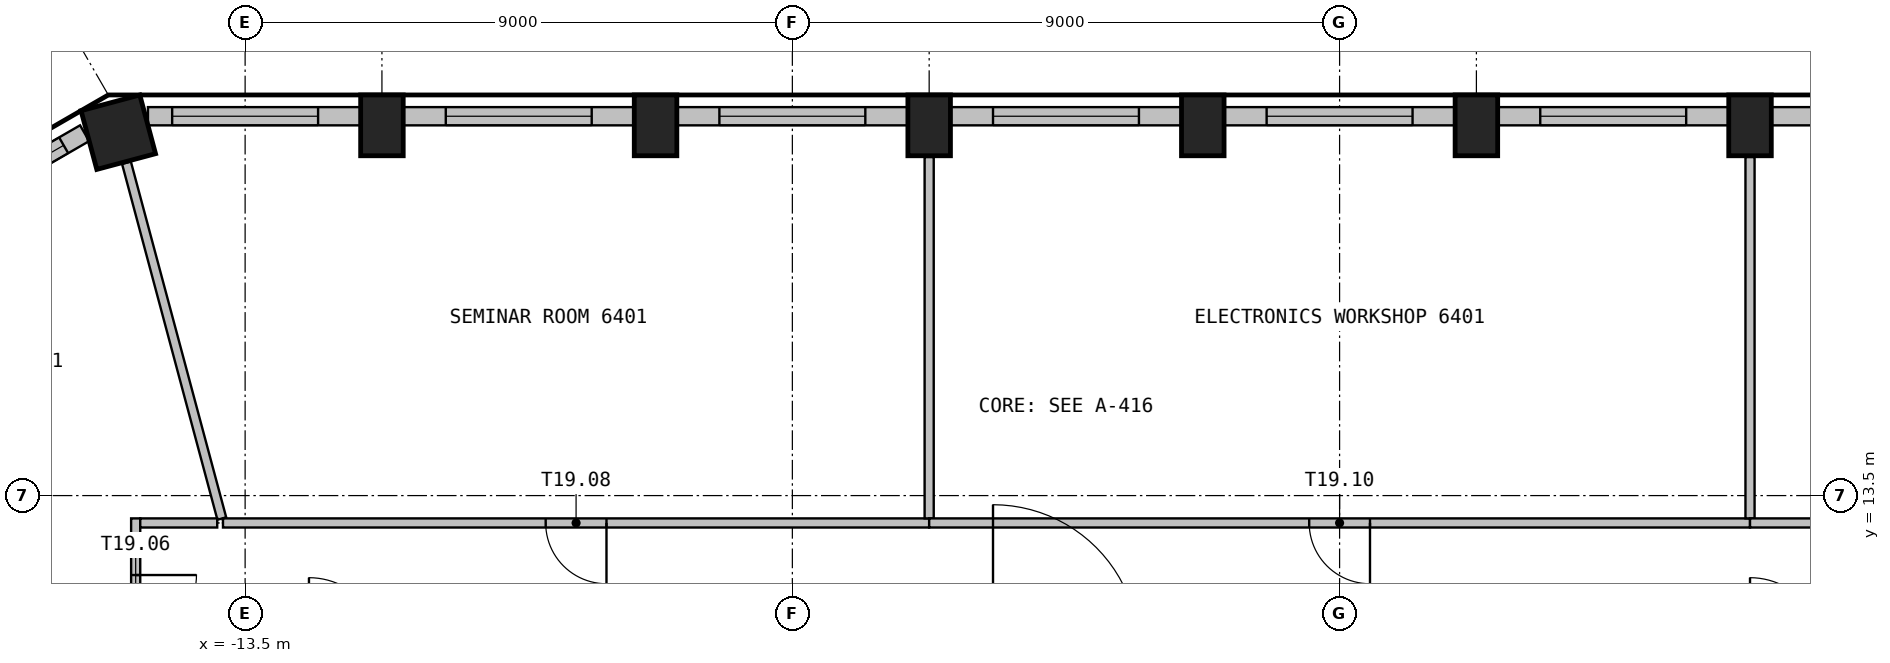
"""IFC4 building model, lengths in metres.
Left out: names, types, materials, properties, quantities, classifications, styles, units other than length and angle.
Written with IfcOpenShell. Run it as: python <this file> out.ifc"""

import sys

from ifc_helpers import new_model, si_unit, direction, frame, frame_2d, origin, origin_2d, place, context, subcontext, project, spatial, rectangle, extrude, element, fill, save


model = new_model("IFC4")
c1 = context("Model", 3, precision=1e-05, world=origin(), true_north=direction((0.0, 1.0)))
c2 = subcontext(c1, "Body", "Model", "MODEL_VIEW")
j1 = project(units=[si_unit("LENGTHUNIT", "METRE"), si_unit("PLANEANGLEUNIT", "RADIAN")], contexts=[c1])
p1 = place(None, origin())
s1 = spatial("IfcSite", under=j1, at=p1, CompositionType="ELEMENT")
p2 = place(p1, origin())
s2 = spatial("IfcBuilding", under=s1, at=p2, CompositionType="ELEMENT")
p3 = place(p2, frame((0.0, 0.0, 258.6)))
s3 = spatial("IfcBuildingStorey", under=s2, at=p3, CompositionType="ELEMENT", Elevation=258.6)
for number, where, z_axis, x_axis in (
    (1, (11.25, 19.588, 0.0), (0.0, 0.0, 1.0), (-1.0, 0.0, 0.0)),
    (2, (6.75, 19.588, 0.0), (0.0, 0.0, 1.0), (-1.0, 0.0, 0.0)),
    (3, (2.25, 19.588, 0.0), (0.0, 0.0, 1.0), (-1.0, 0.0, 0.0)),
    (4, (-2.25, 19.588, 0.0), (0.0, 0.0, 1.0), (-1.0, 0.0, 0.0)),
    (5, (-6.75, 19.588, 0.0), (0.0, 0.0, 1.0), (-1.0, 0.0, 0.0)),
    (6, (-11.25, 19.588, 0.0), (0.0, 0.0, 1.0), (-1.0, 0.0, 0.0)),
):
    element("IfcColumn", number, at=place(p3, frame(where, z_axis=z_axis, x_axis=x_axis)), inside=s3, PredefinedType="COLUMN", context=c2, shape_type="SweptSolid", body=[
        extrude(rectangle(XDim=0.7, YDim=1.0, at=origin_2d()), origin(), (0.0, 0.0, 1.0), 3.575),
    ])
p4 = place(p3, frame((-15.586, 19.476, 0.0), z_axis=(0.0, 0.0, 1.0), x_axis=(-0.965925826289, -0.258819045103, 0.0)))
e7 = element("IfcColumn", 7, at=p4, inside=s3, PredefinedType="COLUMN", context=c2, shape_type="SweptSolid", body=[
    extrude(rectangle(XDim=1.0, YDim=1.0, at=origin_2d()), origin(), (0.0, 0.0, 1.0), 3.575),
])
p5 = place(p3, frame((15.098, 19.739, 0.0), z_axis=(0.0, 0.0, 1.0), x_axis=(-1.0, 0.0, 0.0)))
e8 = element("IfcWall", 8, at=p5, inside=s3, PredefinedType="SOLIDWALL", context=c2, shape_type="SweptSolid", body=[
    extrude(rectangle(XDim=3.498, YDim=0.3, at=frame_2d((1.749, 0.0))), origin(), (0.0, 0.0, 1.0), 3.575),
])
p6 = place(p5, frame((0.398, 0.0, 0.9)))
e9 = element("IfcOpeningElement", 9, at=p6, cuts=e8, PredefinedType="OPENING", context=c2, shape_type="SweptSolid", body=[
    extrude(rectangle(XDim=2.4, YDim=2.1, at=frame_2d((1.2, 1.05))), frame((0.0, 0.16, 0.0), z_axis=(0.0, -1.0, 0.0), x_axis=(1.0, 0.0, 0.0)), (0.0, 0.0, 1.0), 0.32),
])
p7 = place(p3, frame((10.899, 19.739, 0.0), z_axis=(0.0, 0.0, 1.0), x_axis=(-1.0, 0.0, 0.0)))
e10 = element("IfcWall", 10, at=p7, inside=s3, PredefinedType="SOLIDWALL", context=c2, shape_type="SweptSolid", body=[
    extrude(rectangle(XDim=3.799, YDim=0.3, at=frame_2d((1.899, 0.0))), origin(), (0.0, 0.0, 1.0), 3.575),
])
p8 = place(p7, frame((0.699, 0.0, 0.9)))
e11 = element("IfcOpeningElement", 11, at=p8, cuts=e10, PredefinedType="OPENING", context=c2, shape_type="SweptSolid", body=[
    extrude(rectangle(XDim=2.4, YDim=2.1, at=frame_2d((1.2, 1.05))), frame((0.0, 0.16, 0.0), z_axis=(0.0, -1.0, 0.0), x_axis=(1.0, 0.0, 0.0)), (0.0, 0.0, 1.0), 0.32),
])
p9 = place(p3, frame((6.399, 19.739, 0.0), z_axis=(0.0, 0.0, 1.0), x_axis=(-1.0, 0.0, 0.0)))
e12 = element("IfcWall", 12, at=p9, inside=s3, PredefinedType="SOLIDWALL", context=c2, shape_type="SweptSolid", body=[
    extrude(rectangle(XDim=3.799, YDim=0.3, at=frame_2d((1.899, 0.0))), origin(), (0.0, 0.0, 1.0), 3.575),
])
p10 = place(p9, frame((0.699, 0.0, 0.9)))
e13 = element("IfcOpeningElement", 13, at=p10, cuts=e12, PredefinedType="OPENING", context=c2, shape_type="SweptSolid", body=[
    extrude(rectangle(XDim=2.4, YDim=2.1, at=frame_2d((1.2, 1.05))), frame((0.0, 0.16, 0.0), z_axis=(0.0, -1.0, 0.0), x_axis=(1.0, 0.0, 0.0)), (0.0, 0.0, 1.0), 0.32),
])
p11 = place(p3, frame((1.899, 19.739, 0.0), z_axis=(0.0, 0.0, 1.0), x_axis=(-1.0, 0.0, 0.0)))
e14 = element("IfcWall", 14, at=p11, inside=s3, PredefinedType="SOLIDWALL", context=c2, shape_type="SweptSolid", body=[
    extrude(rectangle(XDim=3.799, YDim=0.3, at=frame_2d((1.899, 0.0))), origin(), (0.0, 0.0, 1.0), 3.575),
])
p12 = place(p11, frame((0.699, 0.0, 0.9)))
e15 = element("IfcOpeningElement", 15, at=p12, cuts=e14, PredefinedType="OPENING", context=c2, shape_type="SweptSolid", body=[
    extrude(rectangle(XDim=2.4, YDim=2.1, at=frame_2d((1.2, 1.05))), frame((0.0, 0.16, 0.0), z_axis=(0.0, -1.0, 0.0), x_axis=(1.0, 0.0, 0.0)), (0.0, 0.0, 1.0), 0.32),
])
p13 = place(p3, frame((-2.601, 19.739, 0.0), z_axis=(0.0, 0.0, 1.0), x_axis=(-1.0, 0.0, 0.0)))
e16 = element("IfcWall", 16, at=p13, inside=s3, PredefinedType="SOLIDWALL", context=c2, shape_type="SweptSolid", body=[
    extrude(rectangle(XDim=3.799, YDim=0.3, at=frame_2d((1.899, 0.0))), origin(), (0.0, 0.0, 1.0), 3.575),
])
p14 = place(p13, frame((0.699, 0.0, 0.9)))
e17 = element("IfcOpeningElement", 17, at=p14, cuts=e16, PredefinedType="OPENING", context=c2, shape_type="SweptSolid", body=[
    extrude(rectangle(XDim=2.4, YDim=2.1, at=frame_2d((1.2, 1.05))), frame((0.0, 0.16, 0.0), z_axis=(0.0, -1.0, 0.0), x_axis=(1.0, 0.0, 0.0)), (0.0, 0.0, 1.0), 0.32),
])
p15 = place(p3, frame((-7.101, 19.739, 0.0), z_axis=(0.0, 0.0, 1.0), x_axis=(-1.0, 0.0, 0.0)))
e18 = element("IfcWall", 18, at=p15, inside=s3, PredefinedType="SOLIDWALL", context=c2, shape_type="SweptSolid", body=[
    extrude(rectangle(XDim=3.799, YDim=0.3, at=frame_2d((1.899, 0.0))), origin(), (0.0, 0.0, 1.0), 3.575),
])
p16 = place(p15, frame((0.699, 0.0, 0.9)))
e19 = element("IfcOpeningElement", 19, at=p16, cuts=e18, PredefinedType="OPENING", context=c2, shape_type="SweptSolid", body=[
    extrude(rectangle(XDim=2.4, YDim=2.1, at=frame_2d((1.2, 1.05))), frame((0.0, 0.16, 0.0), z_axis=(0.0, -1.0, 0.0), x_axis=(1.0, 0.0, 0.0)), (0.0, 0.0, 1.0), 0.32),
])
p17 = place(p3, frame((-11.601, 19.739, 0.0), z_axis=(0.0, 0.0, 1.0), x_axis=(-1.0, 0.0, 0.0)))
e20 = element("IfcWall", 20, at=p17, inside=s3, PredefinedType="SOLIDWALL", context=c2, shape_type="SweptSolid", body=[
    extrude(rectangle(XDim=3.498, YDim=0.3, at=frame_2d((1.749, 0.0))), origin(), (0.0, 0.0, 1.0), 3.575),
])
p18 = place(p17, frame((0.699, 0.0, 0.9)))
e21 = element("IfcOpeningElement", 21, at=p18, cuts=e20, PredefinedType="OPENING", context=c2, shape_type="SweptSolid", body=[
    extrude(rectangle(XDim=2.4, YDim=2.1, at=frame_2d((1.2, 1.05))), frame((0.0, 0.16, 0.0), z_axis=(0.0, -1.0, 0.0), x_axis=(1.0, 0.0, 0.0)), (0.0, 0.0, 1.0), 0.32),
])
p19 = place(p3, frame((-16.14, 19.459, 0.0), z_axis=(0.0, 0.0, 1.0), x_axis=(-0.866025316205, -0.500000151692, 0.0)))
e22 = element("IfcWall", 22, at=p19, inside=s3, PredefinedType="SOLIDWALL", context=c2, shape_type="SweptSolid", body=[
    extrude(rectangle(XDim=3.196, YDim=0.3, at=frame_2d((1.598, 0.0))), origin(), (0.0, 0.0, 1.0), 3.575),
])
p20 = place(p19, frame((0.398, 0.0, 0.9)))
e23 = element("IfcOpeningElement", 23, at=p20, cuts=e22, PredefinedType="OPENING", context=c2, shape_type="SweptSolid", body=[
    extrude(rectangle(XDim=2.4, YDim=2.1, at=frame_2d((1.2, 1.05))), frame((0.0, 0.16, 0.0), z_axis=(0.0, -1.0, 0.0), x_axis=(1.0, 0.0, 0.0)), (0.0, 0.0, 1.0), 0.32),
])
p21 = place(p3, frame((-19.8, 12.73, 0.0), z_axis=(0.0, 0.0, 1.0), x_axis=(0.866028396804, -0.499994815902, 0.0)))
e24 = element("IfcWall", 24, at=p21, inside=s3, PredefinedType="PARTITIONING", context=c2, shape_type="SweptSolid", body=[
    extrude(rectangle(XDim=5.121, YDim=0.15, at=frame_2d((2.561, 0.0))), origin(), (0.0, 0.0, 1.0), 3.575),
])
p22 = place(p3, frame((-15.452, 18.974, 0.0), z_axis=(0.0, 0.0, 1.0), x_axis=(0.258896568031, -0.965905050749, 0.0)))
e25 = element("IfcWall", 25, at=p22, inside=s3, PredefinedType="PARTITIONING", context=c2, shape_type="SweptSolid", body=[
    extrude(rectangle(XDim=6.058, YDim=0.15, at=frame_2d((3.029, 0.0))), origin(), (0.0, 0.0, 1.0), 3.575),
])
p23 = place(p3, frame((-15.3, 13.125, 0.0), z_axis=(0.0, 0.0, 1.0), x_axis=(0.0, -1.0, 0.0)))
e26 = element("IfcWall", 26, at=p23, inside=s3, PredefinedType="PARTITIONING", context=c2, shape_type="SweptSolid", body=[
    extrude(rectangle(XDim=2.863, YDim=0.15, at=frame_2d((1.432, 0.0))), origin(), (0.0, 0.0, 1.0), 3.575),
])
p24 = place(p23, frame((0.931, 0.0, 0.0)))
e27 = element("IfcOpeningElement", 27, at=p24, cuts=e26, PredefinedType="OPENING", context=c2, shape_type="SweptSolid", body=[
    extrude(rectangle(XDim=1.0, YDim=2.1, at=frame_2d((0.5, 1.05))), frame((0.0, 0.085, 0.0), z_axis=(0.0, -1.0, 0.0), x_axis=(1.0, 0.0, 0.0)), (0.0, 0.0, 1.0), 0.17),
])
p25 = place(p3, frame((-13.959, 13.05, 0.0), z_axis=(0.0, 0.0, 1.0), x_axis=(-1.0, 0.0, 0.0)))
e28 = element("IfcWall", 28, at=p25, inside=s3, PredefinedType="PARTITIONING", context=c2, shape_type="SweptSolid", body=[
    extrude(rectangle(XDim=1.266, YDim=0.15, at=frame_2d((0.633, 0.0))), origin(), (0.0, 0.0, 1.0), 3.575),
])
p26 = place(p3, frame((-2.25, 13.05, 0.0), z_axis=(0.0, 0.0, 1.0), x_axis=(-1.0, 0.0, 0.0)))
e29 = element("IfcWall", 29, at=p26, inside=s3, PredefinedType="PARTITIONING", context=c2, shape_type="SweptSolid", body=[
    extrude(rectangle(XDim=11.614, YDim=0.15, at=frame_2d((5.807, 0.0))), origin(), (0.0, 0.0, 1.0), 3.575),
])
p27 = place(p26, frame((5.307, 0.0, 0.0)))
e30 = element("IfcOpeningElement", 30, at=p27, cuts=e29, PredefinedType="OPENING", context=c2, shape_type="SweptSolid", body=[
    extrude(rectangle(XDim=1.0, YDim=2.1, at=frame_2d((0.5, 1.05))), frame((0.0, 0.085, 0.0), z_axis=(0.0, -1.0, 0.0), x_axis=(1.0, 0.0, 0.0)), (0.0, 0.0, 1.0), 0.17),
])
p28 = place(p3, frame((-2.25, 19.069, 0.0), z_axis=(0.0, 0.0, 1.0), x_axis=(0.0, -1.0, 0.0)))
e31 = element("IfcWall", 31, at=p28, inside=s3, PredefinedType="PARTITIONING", context=c2, shape_type="SweptSolid", body=[
    extrude(rectangle(XDim=5.944, YDim=0.15, at=frame_2d((2.972, 0.0))), origin(), (0.0, 0.0, 1.0), 3.575),
])
p29 = place(p3, frame((11.25, 13.05, 0.0), z_axis=(0.0, 0.0, 1.0), x_axis=(-1.0, 0.0, 0.0)))
e32 = element("IfcWall", 32, at=p29, inside=s3, PredefinedType="PARTITIONING", context=c2, shape_type="SweptSolid", body=[
    extrude(rectangle(XDim=13.5, YDim=0.15, at=frame_2d((6.75, 0.0))), origin(), (0.0, 0.0, 1.0), 3.575),
])
p30 = place(p29, frame((6.25, 0.0, 0.0)))
e33 = element("IfcOpeningElement", 33, at=p30, cuts=e32, PredefinedType="OPENING", context=c2, shape_type="SweptSolid", body=[
    extrude(rectangle(XDim=1.0, YDim=2.1, at=frame_2d((0.5, 1.05))), frame((0.0, 0.085, 0.0), z_axis=(0.0, -1.0, 0.0), x_axis=(1.0, 0.0, 0.0)), (0.0, 0.0, 1.0), 0.17),
])
p31 = place(p3, frame((11.25, 19.069, 0.0), z_axis=(0.0, 0.0, 1.0), x_axis=(0.0, -1.0, 0.0)))
e34 = element("IfcWall", 34, at=p31, inside=s3, PredefinedType="PARTITIONING", context=c2, shape_type="SweptSolid", body=[
    extrude(rectangle(XDim=5.944, YDim=0.15, at=frame_2d((2.972, 0.0))), origin(), (0.0, 0.0, 1.0), 3.575),
])
p32 = place(p3, frame((15.375, 13.05, 0.0), z_axis=(0.0, 0.0, 1.0), x_axis=(-1.0, 0.0, 0.0)))
e35 = element("IfcWall", 35, at=p32, inside=s3, PredefinedType="PARTITIONING", context=c2, shape_type="SweptSolid", body=[
    extrude(rectangle(XDim=4.125, YDim=0.15, at=frame_2d((2.062, 0.0))), origin(), (0.0, 0.0, 1.0), 3.575),
])
p33 = place(p8, origin())
e36 = element("IfcWindow", 36, at=p33, inside=s3, PartitioningType="SINGLE_PANEL", PredefinedType="WINDOW", context=c2, shape_type="SweptSolid", body=[
    extrude(rectangle(XDim=2.4, YDim=2.1, at=frame_2d((1.2, 1.05))), frame((0.0, 0.03, 0.0), z_axis=(0.0, -1.0, 0.0), x_axis=(1.0, 0.0, 0.0)), (0.0, 0.0, 1.0), 0.06),
])
fill(e11, e36)
p34 = place(p10, origin())
e37 = element("IfcWindow", 37, at=p34, inside=s3, PartitioningType="SINGLE_PANEL", PredefinedType="WINDOW", context=c2, shape_type="SweptSolid", body=[
    extrude(rectangle(XDim=2.4, YDim=2.1, at=frame_2d((1.2, 1.05))), frame((0.0, 0.03, 0.0), z_axis=(0.0, -1.0, 0.0), x_axis=(1.0, 0.0, 0.0)), (0.0, 0.0, 1.0), 0.06),
])
fill(e13, e37)
p35 = place(p12, origin())
e38 = element("IfcWindow", 38, at=p35, inside=s3, PartitioningType="SINGLE_PANEL", PredefinedType="WINDOW", context=c2, shape_type="SweptSolid", body=[
    extrude(rectangle(XDim=2.4, YDim=2.1, at=frame_2d((1.2, 1.05))), frame((0.0, 0.03, 0.0), z_axis=(0.0, -1.0, 0.0), x_axis=(1.0, 0.0, 0.0)), (0.0, 0.0, 1.0), 0.06),
])
fill(e15, e38)
p36 = place(p14, origin())
e39 = element("IfcWindow", 39, at=p36, inside=s3, PartitioningType="SINGLE_PANEL", PredefinedType="WINDOW", context=c2, shape_type="SweptSolid", body=[
    extrude(rectangle(XDim=2.4, YDim=2.1, at=frame_2d((1.2, 1.05))), frame((0.0, 0.03, 0.0), z_axis=(0.0, -1.0, 0.0), x_axis=(1.0, 0.0, 0.0)), (0.0, 0.0, 1.0), 0.06),
])
fill(e17, e39)
p37 = place(p16, origin())
e40 = element("IfcWindow", 40, at=p37, inside=s3, PartitioningType="SINGLE_PANEL", PredefinedType="WINDOW", context=c2, shape_type="SweptSolid", body=[
    extrude(rectangle(XDim=2.4, YDim=2.1, at=frame_2d((1.2, 1.05))), frame((0.0, 0.03, 0.0), z_axis=(0.0, -1.0, 0.0), x_axis=(1.0, 0.0, 0.0)), (0.0, 0.0, 1.0), 0.06),
])
fill(e19, e40)
p38 = place(p18, origin())
e41 = element("IfcWindow", 41, at=p38, inside=s3, PartitioningType="SINGLE_PANEL", PredefinedType="WINDOW", context=c2, shape_type="SweptSolid", body=[
    extrude(rectangle(XDim=2.4, YDim=2.1, at=frame_2d((1.2, 1.05))), frame((0.0, 0.03, 0.0), z_axis=(0.0, -1.0, 0.0), x_axis=(1.0, 0.0, 0.0)), (0.0, 0.0, 1.0), 0.06),
])
fill(e21, e41)
p39 = place(p20, origin())
e42 = element("IfcWindow", 42, at=p39, inside=s3, PartitioningType="SINGLE_PANEL", PredefinedType="WINDOW", context=c2, shape_type="SweptSolid", body=[
    extrude(rectangle(XDim=2.4, YDim=2.1, at=frame_2d((1.2, 1.05))), frame((0.0, 0.03, 0.0), z_axis=(0.0, -1.0, 0.0), x_axis=(1.0, 0.0, 0.0)), (0.0, 0.0, 1.0), 0.06),
])
fill(e23, e42)
p40 = place(p24, origin())
e43 = element("IfcDoor", 43, at=p40, inside=s3, OperationType="SINGLE_SWING_RIGHT", PredefinedType="DOOR", context=c2, shape_type="SweptSolid", body=[
    extrude(rectangle(XDim=1.0, YDim=2.1, at=frame_2d((0.5, 1.05))), frame((0.0, 0.025, 0.0), z_axis=(0.0, -1.0, 0.0), x_axis=(1.0, 0.0, 0.0)), (0.0, 0.0, 1.0), 0.05),
])
fill(e27, e43)
p41 = place(p27, origin())
e44 = element("IfcDoor", 44, at=p41, inside=s3, OperationType="SINGLE_SWING_LEFT", PredefinedType="DOOR", context=c2, shape_type="SweptSolid", body=[
    extrude(rectangle(XDim=1.0, YDim=2.1, at=frame_2d((0.5, 1.05))), frame((0.0, 0.025, 0.0), z_axis=(0.0, -1.0, 0.0), x_axis=(1.0, 0.0, 0.0)), (0.0, 0.0, 1.0), 0.05),
])
fill(e30, e44)
p42 = place(p30, origin())
e45 = element("IfcDoor", 45, at=p42, inside=s3, OperationType="SINGLE_SWING_LEFT", PredefinedType="DOOR", context=c2, shape_type="SweptSolid", body=[
    extrude(rectangle(XDim=1.0, YDim=2.1, at=frame_2d((0.5, 1.05))), frame((0.0, 0.025, 0.0), z_axis=(0.0, -1.0, 0.0), x_axis=(1.0, 0.0, 0.0)), (0.0, 0.0, 1.0), 0.05),
])
fill(e33, e45)
save(model, sys.argv[1])
